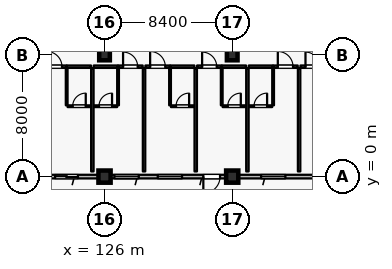
"""IFC4 building model, lengths in metres.
Left out: names, types, materials, properties, quantities, classifications, styles, units other than length and angle.
Written with IfcOpenShell. Run it as: python <this file> out.ifc"""

import sys

from ifc_helpers import new_model, si_unit, direction, frame, frame_2d, origin, origin_2d, place, context, subcontext, project, spatial, rectangle, extrude, element, fill, save


model = new_model("IFC4")
c1 = context("Model", 3, precision=1e-05, world=origin(), true_north=direction((0.0, 1.0)))
c2 = subcontext(c1, "Body", "Model", "MODEL_VIEW")
j1 = project(units=[si_unit("LENGTHUNIT", "METRE"), si_unit("PLANEANGLEUNIT", "RADIAN")], contexts=[c1])
p1 = place(None, origin())
s1 = spatial("IfcSite", under=j1, at=p1, CompositionType="ELEMENT")
p2 = place(p1, origin())
s2 = spatial("IfcBuilding", under=s1, at=p2, CompositionType="ELEMENT")
p3 = place(p2, frame((0.0, 0.0, 25.2)))
s3 = spatial("IfcBuildingStorey", under=s2, at=p3, CompositionType="ELEMENT", Elevation=25.2)
for number, where, z_axis, x_axis in (
    (1, (126.0, 0.0, 0.0), (0.0, 0.0, 1.0), (1.0, 0.0, 0.0)),
    (2, (134.4, 0.0, 0.0), (0.0, 0.0, 1.0), (1.0, 0.0, 0.0)),
):
    element("IfcColumn", number, at=place(p3, frame(where, z_axis=z_axis, x_axis=x_axis)), inside=s3, PredefinedType="COLUMN", context=c2, shape_type="SweptSolid", body=[
        extrude(rectangle(XDim=0.8, YDim=0.8, at=origin_2d()), origin(), (0.0, 0.0, 1.0), 3.6),
    ])
for number, where, z_axis, x_axis in (
    (3, (126.0, 8.0, 0.0), (0.0, 0.0, 1.0), (1.0, 0.0, 0.0)),
    (4, (134.4, 8.0, 0.0), (0.0, 0.0, 1.0), (1.0, 0.0, 0.0)),
):
    element("IfcColumn", number, at=place(p3, frame(where, z_axis=z_axis, x_axis=x_axis)), inside=s3, PredefinedType="COLUMN", context=c2, shape_type="SweptSolid", body=[
        extrude(rectangle(XDim=0.7, YDim=0.7, at=origin_2d()), origin(), (0.0, 0.0, 1.0), 3.6),
    ])
p4 = place(p3, frame((125.6, 0.0, 0.0), z_axis=(0.0, 0.0, 1.0), x_axis=(-1.0, 0.0, 0.0)))
e5 = element("IfcWall", 5, at=p4, inside=s3, PredefinedType="SOLIDWALL", context=c2, shape_type="SweptSolid", body=[
    extrude(rectangle(XDim=7.6, YDim=0.24, at=frame_2d((3.8, 0.0))), origin(), (0.0, 0.0, 1.0), 2.93),
])
p5 = place(p4, frame((1.35, 0.0, 0.0)))
e6 = element("IfcOpeningElement", 6, at=p5, cuts=e5, PredefinedType="OPENING", context=c2, shape_type="SweptSolid", body=[
    extrude(rectangle(XDim=1.5, YDim=2.25, at=frame_2d((0.75, 1.125))), frame((0.0, 0.13, 0.0), z_axis=(0.0, -1.0, 0.0), x_axis=(1.0, 0.0, 0.0)), (0.0, 0.0, 1.0), 0.26),
])
p6 = place(p4, frame((4.7, 0.0, 0.8)))
e7 = element("IfcOpeningElement", 7, at=p6, cuts=e5, PredefinedType="OPENING", context=c2, shape_type="SweptSolid", body=[
    extrude(rectangle(XDim=1.6, YDim=1.6, at=frame_2d((0.8, 0.8))), frame((0.0, 0.13, 0.0), z_axis=(0.0, -1.0, 0.0), x_axis=(1.0, 0.0, 0.0)), (0.0, 0.0, 1.0), 0.26),
])
p7 = place(p3, frame((134.0, 0.0, 0.0), z_axis=(0.0, 0.0, 1.0), x_axis=(-1.0, 0.0, 0.0)))
e8 = element("IfcWall", 8, at=p7, inside=s3, PredefinedType="SOLIDWALL", context=c2, shape_type="SweptSolid", body=[
    extrude(rectangle(XDim=7.6, YDim=0.24, at=frame_2d((3.8, 0.0))), origin(), (0.0, 0.0, 1.0), 2.93),
])
p8 = place(p7, frame((0.4, 0.0, 0.0)))
e9 = element("IfcOpeningElement", 9, at=p8, cuts=e8, PredefinedType="OPENING", context=c2, shape_type="SweptSolid", body=[
    extrude(rectangle(XDim=1.1, YDim=2.2, at=frame_2d((0.55, 1.1))), frame((0.0, 0.13, 0.0), z_axis=(0.0, -1.0, 0.0), x_axis=(1.0, 0.0, 0.0)), (0.0, 0.0, 1.0), 0.26),
])
p9 = place(p7, frame((2.9, 0.0, 0.8)))
e10 = element("IfcOpeningElement", 10, at=p9, cuts=e8, PredefinedType="OPENING", context=c2, shape_type="SweptSolid", body=[
    extrude(rectangle(XDim=1.6, YDim=1.6, at=frame_2d((0.8, 0.8))), frame((0.0, 0.13, 0.0), z_axis=(0.0, -1.0, 0.0), x_axis=(1.0, 0.0, 0.0)), (0.0, 0.0, 1.0), 0.26),
])
p10 = place(p7, frame((5.75, 0.0, 0.8)))
e11 = element("IfcOpeningElement", 11, at=p10, cuts=e8, PredefinedType="OPENING", context=c2, shape_type="SweptSolid", body=[
    extrude(rectangle(XDim=1.6, YDim=1.6, at=frame_2d((0.8, 0.8))), frame((0.0, 0.13, 0.0), z_axis=(0.0, -1.0, 0.0), x_axis=(1.0, 0.0, 0.0)), (0.0, 0.0, 1.0), 0.26),
])
p11 = place(p3, frame((142.4, 0.0, 0.0), z_axis=(0.0, 0.0, 1.0), x_axis=(-1.0, 0.0, 0.0)))
e12 = element("IfcWall", 12, at=p11, inside=s3, PredefinedType="SOLIDWALL", context=c2, shape_type="SweptSolid", body=[
    extrude(rectangle(XDim=7.6, YDim=0.24, at=frame_2d((3.8, 0.0))), origin(), (0.0, 0.0, 1.0), 2.93),
])
p12 = place(p11, frame((1.15, 0.0, 0.0)))
e13 = element("IfcOpeningElement", 13, at=p12, cuts=e12, PredefinedType="OPENING", context=c2, shape_type="SweptSolid", body=[
    extrude(rectangle(XDim=1.5, YDim=2.25, at=frame_2d((0.75, 1.125))), frame((0.0, 0.13, 0.0), z_axis=(0.0, -1.0, 0.0), x_axis=(1.0, 0.0, 0.0)), (0.0, 0.0, 1.0), 0.26),
])
p13 = place(p11, frame((4.5, 0.0, 0.8)))
e14 = element("IfcOpeningElement", 14, at=p13, cuts=e12, PredefinedType="OPENING", context=c2, shape_type="SweptSolid", body=[
    extrude(rectangle(XDim=1.6, YDim=1.6, at=frame_2d((0.8, 0.8))), frame((0.0, 0.13, 0.0), z_axis=(0.0, -1.0, 0.0), x_axis=(1.0, 0.0, 0.0)), (0.0, 0.0, 1.0), 0.26),
])
p14 = place(p3, frame((121.89, 7.23, 0.0), z_axis=(0.0, 0.0, 1.0), x_axis=(1.0, 0.0, 0.0)))
e15 = element("IfcWall", 15, at=p14, inside=s3, PredefinedType="PARTITIONING", context=c2, shape_type="SweptSolid", body=[
    extrude(rectangle(XDim=1.62, YDim=0.16, at=frame_2d((0.81, 0.0))), origin(), (0.0, 0.0, 1.0), 3.335),
])
p15 = place(p14, frame((0.31, 0.0, 0.0)))
e16 = element("IfcOpeningElement", 16, at=p15, cuts=e15, PredefinedType="OPENING", context=c2, shape_type="SweptSolid", body=[
    extrude(rectangle(XDim=1.0, YDim=2.25, at=frame_2d((0.5, 1.125))), frame((0.0, 0.09, 0.0), z_axis=(0.0, -1.0, 0.0), x_axis=(1.0, 0.0, 0.0)), (0.0, 0.0, 1.0), 0.18),
])
p16 = place(p3, frame((123.52, 7.23, 0.0), z_axis=(0.0, 0.0, 1.0), x_axis=(1.0, 0.0, 0.0)))
e17 = element("IfcWall", 17, at=p16, inside=s3, PredefinedType="PARTITIONING", context=c2, shape_type="SweptSolid", body=[
    extrude(rectangle(XDim=1.59, YDim=0.16, at=frame_2d((0.795, 0.0))), origin(), (0.0, 0.0, 1.0), 3.335),
])
p17 = place(p3, frame((123.51, 4.69, 0.0), z_axis=(0.0, 0.0, 1.0), x_axis=(0.0, 1.0, 0.0)))
e18 = element("IfcWall", 18, at=p17, inside=s3, PredefinedType="PARTITIONING", context=c2, shape_type="SweptSolid", body=[
    extrude(rectangle(XDim=2.45, YDim=0.115, at=frame_2d((1.225, 0.0))), origin(), (0.0, 0.0, 1.0), 3.335),
])
p18 = place(p3, frame((123.57, 4.63, 0.0), z_axis=(0.0, 0.0, 1.0), x_axis=(1.0, 0.0, 0.0)))
e19 = element("IfcWall", 19, at=p18, inside=s3, PredefinedType="PARTITIONING", context=c2, shape_type="SweptSolid", body=[
    extrude(rectangle(XDim=1.53, YDim=0.115, at=frame_2d((0.765, 0.0))), origin(), (0.0, 0.0, 1.0), 3.335),
])
p19 = place(p18, frame((0.335, 0.0, 0.0)))
e20 = element("IfcOpeningElement", 20, at=p19, cuts=e19, PredefinedType="OPENING", context=c2, shape_type="SweptSolid", body=[
    extrude(rectangle(XDim=0.86, YDim=2.12, at=frame_2d((0.43, 1.06))), frame((0.0, 0.067, 0.0), z_axis=(0.0, -1.0, 0.0), x_axis=(1.0, 0.0, 0.0)), (0.0, 0.0, 1.0), 0.135),
])
p20 = place(p3, frame((125.29, 7.23, 0.0), z_axis=(0.0, 0.0, 1.0), x_axis=(1.0, 0.0, 0.0)))
e21 = element("IfcWall", 21, at=p20, inside=s3, PredefinedType="PARTITIONING", context=c2, shape_type="SweptSolid", body=[
    extrude(rectangle(XDim=1.59, YDim=0.16, at=frame_2d((0.795, 0.0))), origin(), (0.0, 0.0, 1.0), 3.335),
])
p21 = place(p3, frame((126.89, 7.23, 0.0), z_axis=(0.0, 0.0, 1.0), x_axis=(1.0, 0.0, 0.0)))
e22 = element("IfcWall", 22, at=p21, inside=s3, PredefinedType="PARTITIONING", context=c2, shape_type="SweptSolid", body=[
    extrude(rectangle(XDim=1.62, YDim=0.16, at=frame_2d((0.81, 0.0))), origin(), (0.0, 0.0, 1.0), 3.335),
])
p22 = place(p21, frame((0.33, 0.0, 0.0)))
e23 = element("IfcOpeningElement", 23, at=p22, cuts=e22, PredefinedType="OPENING", context=c2, shape_type="SweptSolid", body=[
    extrude(rectangle(XDim=0.96, YDim=2.2, at=frame_2d((0.48, 1.1))), frame((0.0, 0.09, 0.0), z_axis=(0.0, -1.0, 0.0), x_axis=(1.0, 0.0, 0.0)), (0.0, 0.0, 1.0), 0.18),
])
p23 = place(p3, frame((126.89, 4.69, 0.0), z_axis=(0.0, 0.0, 1.0), x_axis=(0.0, 1.0, 0.0)))
e24 = element("IfcWall", 24, at=p23, inside=s3, PredefinedType="PARTITIONING", context=c2, shape_type="SweptSolid", body=[
    extrude(rectangle(XDim=2.45, YDim=0.115, at=frame_2d((1.225, 0.0))), origin(), (0.0, 0.0, 1.0), 3.335),
])
p24 = place(p3, frame((125.3, 4.63, 0.0), z_axis=(0.0, 0.0, 1.0), x_axis=(1.0, 0.0, 0.0)))
e25 = element("IfcWall", 25, at=p24, inside=s3, PredefinedType="PARTITIONING", context=c2, shape_type="SweptSolid", body=[
    extrude(rectangle(XDim=1.53, YDim=0.115, at=frame_2d((0.765, 0.0))), origin(), (0.0, 0.0, 1.0), 3.335),
])
p25 = place(p24, frame((0.335, 0.0, 0.0)))
e26 = element("IfcOpeningElement", 26, at=p25, cuts=e25, PredefinedType="OPENING", context=c2, shape_type="SweptSolid", body=[
    extrude(rectangle(XDim=0.86, YDim=2.12, at=frame_2d((0.43, 1.06))), frame((0.0, 0.067, 0.0), z_axis=(0.0, -1.0, 0.0), x_axis=(1.0, 0.0, 0.0)), (0.0, 0.0, 1.0), 0.135),
])
p26 = place(p3, frame((125.2, 0.34, 0.0), z_axis=(0.0, 0.0, 1.0), x_axis=(0.0, 1.0, 0.0)))
e27 = element("IfcWall", 27, at=p26, inside=s3, PredefinedType="PARTITIONING", context=c2, shape_type="SweptSolid", body=[
    extrude(rectangle(XDim=6.8, YDim=0.16, at=frame_2d((3.4, 0.0))), origin(), (0.0, 0.0, 1.0), 3.335),
])
p27 = place(p3, frame((128.69, 7.23, 0.0), z_axis=(0.0, 0.0, 1.0), x_axis=(1.0, 0.0, 0.0)))
e28 = element("IfcWall", 28, at=p27, inside=s3, PredefinedType="PARTITIONING", context=c2, shape_type="SweptSolid", body=[
    extrude(rectangle(XDim=1.62, YDim=0.16, at=frame_2d((0.81, 0.0))), origin(), (0.0, 0.0, 1.0), 3.335),
])
p28 = place(p27, frame((0.31, 0.0, 0.0)))
e29 = element("IfcOpeningElement", 29, at=p28, cuts=e28, PredefinedType="OPENING", context=c2, shape_type="SweptSolid", body=[
    extrude(rectangle(XDim=1.0, YDim=2.25, at=frame_2d((0.5, 1.125))), frame((0.0, 0.09, 0.0), z_axis=(0.0, -1.0, 0.0), x_axis=(1.0, 0.0, 0.0)), (0.0, 0.0, 1.0), 0.18),
])
p29 = place(p3, frame((130.32, 7.23, 0.0), z_axis=(0.0, 0.0, 1.0), x_axis=(1.0, 0.0, 0.0)))
e30 = element("IfcWall", 30, at=p29, inside=s3, PredefinedType="PARTITIONING", context=c2, shape_type="SweptSolid", body=[
    extrude(rectangle(XDim=1.59, YDim=0.16, at=frame_2d((0.795, 0.0))), origin(), (0.0, 0.0, 1.0), 3.335),
])
p30 = place(p3, frame((130.31, 4.69, 0.0), z_axis=(0.0, 0.0, 1.0), x_axis=(0.0, 1.0, 0.0)))
e31 = element("IfcWall", 31, at=p30, inside=s3, PredefinedType="PARTITIONING", context=c2, shape_type="SweptSolid", body=[
    extrude(rectangle(XDim=2.45, YDim=0.115, at=frame_2d((1.225, 0.0))), origin(), (0.0, 0.0, 1.0), 3.335),
])
p31 = place(p3, frame((130.37, 4.63, 0.0), z_axis=(0.0, 0.0, 1.0), x_axis=(1.0, 0.0, 0.0)))
e32 = element("IfcWall", 32, at=p31, inside=s3, PredefinedType="PARTITIONING", context=c2, shape_type="SweptSolid", body=[
    extrude(rectangle(XDim=1.53, YDim=0.115, at=frame_2d((0.765, 0.0))), origin(), (0.0, 0.0, 1.0), 3.335),
])
p32 = place(p31, frame((0.335, 0.0, 0.0)))
e33 = element("IfcOpeningElement", 33, at=p32, cuts=e32, PredefinedType="OPENING", context=c2, shape_type="SweptSolid", body=[
    extrude(rectangle(XDim=0.86, YDim=2.12, at=frame_2d((0.43, 1.06))), frame((0.0, 0.067, 0.0), z_axis=(0.0, -1.0, 0.0), x_axis=(1.0, 0.0, 0.0)), (0.0, 0.0, 1.0), 0.135),
])
p33 = place(p3, frame((128.6, 0.34, 0.0), z_axis=(0.0, 0.0, 1.0), x_axis=(0.0, 1.0, 0.0)))
e34 = element("IfcWall", 34, at=p33, inside=s3, PredefinedType="PARTITIONING", context=c2, shape_type="SweptSolid", body=[
    extrude(rectangle(XDim=6.8, YDim=0.16, at=frame_2d((3.4, 0.0))), origin(), (0.0, 0.0, 1.0), 3.335),
])
p34 = place(p3, frame((132.09, 7.23, 0.0), z_axis=(0.0, 0.0, 1.0), x_axis=(1.0, 0.0, 0.0)))
e35 = element("IfcWall", 35, at=p34, inside=s3, PredefinedType="PARTITIONING", context=c2, shape_type="SweptSolid", body=[
    extrude(rectangle(XDim=1.62, YDim=0.16, at=frame_2d((0.81, 0.0))), origin(), (0.0, 0.0, 1.0), 3.335),
])
p35 = place(p34, frame((0.33, 0.0, 0.0)))
e36 = element("IfcOpeningElement", 36, at=p35, cuts=e35, PredefinedType="OPENING", context=c2, shape_type="SweptSolid", body=[
    extrude(rectangle(XDim=0.96, YDim=2.2, at=frame_2d((0.48, 1.1))), frame((0.0, 0.09, 0.0), z_axis=(0.0, -1.0, 0.0), x_axis=(1.0, 0.0, 0.0)), (0.0, 0.0, 1.0), 0.18),
])
p36 = place(p3, frame((133.72, 7.23, 0.0), z_axis=(0.0, 0.0, 1.0), x_axis=(1.0, 0.0, 0.0)))
e37 = element("IfcWall", 37, at=p36, inside=s3, PredefinedType="PARTITIONING", context=c2, shape_type="SweptSolid", body=[
    extrude(rectangle(XDim=1.59, YDim=0.16, at=frame_2d((0.795, 0.0))), origin(), (0.0, 0.0, 1.0), 3.335),
])
p37 = place(p3, frame((133.71, 4.69, 0.0), z_axis=(0.0, 0.0, 1.0), x_axis=(0.0, 1.0, 0.0)))
e38 = element("IfcWall", 38, at=p37, inside=s3, PredefinedType="PARTITIONING", context=c2, shape_type="SweptSolid", body=[
    extrude(rectangle(XDim=2.45, YDim=0.115, at=frame_2d((1.225, 0.0))), origin(), (0.0, 0.0, 1.0), 3.335),
])
p38 = place(p3, frame((133.77, 4.63, 0.0), z_axis=(0.0, 0.0, 1.0), x_axis=(1.0, 0.0, 0.0)))
e39 = element("IfcWall", 39, at=p38, inside=s3, PredefinedType="PARTITIONING", context=c2, shape_type="SweptSolid", body=[
    extrude(rectangle(XDim=1.53, YDim=0.115, at=frame_2d((0.765, 0.0))), origin(), (0.0, 0.0, 1.0), 3.335),
])
p39 = place(p38, frame((0.335, 0.0, 0.0)))
e40 = element("IfcOpeningElement", 40, at=p39, cuts=e39, PredefinedType="OPENING", context=c2, shape_type="SweptSolid", body=[
    extrude(rectangle(XDim=0.86, YDim=2.12, at=frame_2d((0.43, 1.06))), frame((0.0, 0.067, 0.0), z_axis=(0.0, -1.0, 0.0), x_axis=(1.0, 0.0, 0.0)), (0.0, 0.0, 1.0), 0.135),
])
p40 = place(p3, frame((132.0, 0.34, 0.0), z_axis=(0.0, 0.0, 1.0), x_axis=(0.0, 1.0, 0.0)))
e41 = element("IfcWall", 41, at=p40, inside=s3, PredefinedType="PARTITIONING", context=c2, shape_type="SweptSolid", body=[
    extrude(rectangle(XDim=6.8, YDim=0.16, at=frame_2d((3.4, 0.0))), origin(), (0.0, 0.0, 1.0), 3.335),
])
p41 = place(p3, frame((135.49, 7.23, 0.0), z_axis=(0.0, 0.0, 1.0), x_axis=(1.0, 0.0, 0.0)))
e42 = element("IfcWall", 42, at=p41, inside=s3, PredefinedType="PARTITIONING", context=c2, shape_type="SweptSolid", body=[
    extrude(rectangle(XDim=1.59, YDim=0.16, at=frame_2d((0.795, 0.0))), origin(), (0.0, 0.0, 1.0), 3.335),
])
p42 = place(p3, frame((137.09, 7.23, 0.0), z_axis=(0.0, 0.0, 1.0), x_axis=(1.0, 0.0, 0.0)))
e43 = element("IfcWall", 43, at=p42, inside=s3, PredefinedType="PARTITIONING", context=c2, shape_type="SweptSolid", body=[
    extrude(rectangle(XDim=1.62, YDim=0.16, at=frame_2d((0.81, 0.0))), origin(), (0.0, 0.0, 1.0), 3.335),
])
p43 = place(p42, frame((0.31, 0.0, 0.0)))
e44 = element("IfcOpeningElement", 44, at=p43, cuts=e43, PredefinedType="OPENING", context=c2, shape_type="SweptSolid", body=[
    extrude(rectangle(XDim=1.0, YDim=2.25, at=frame_2d((0.5, 1.125))), frame((0.0, 0.09, 0.0), z_axis=(0.0, -1.0, 0.0), x_axis=(1.0, 0.0, 0.0)), (0.0, 0.0, 1.0), 0.18),
])
p44 = place(p3, frame((137.09, 4.69, 0.0), z_axis=(0.0, 0.0, 1.0), x_axis=(0.0, 1.0, 0.0)))
e45 = element("IfcWall", 45, at=p44, inside=s3, PredefinedType="PARTITIONING", context=c2, shape_type="SweptSolid", body=[
    extrude(rectangle(XDim=2.45, YDim=0.115, at=frame_2d((1.225, 0.0))), origin(), (0.0, 0.0, 1.0), 3.335),
])
p45 = place(p3, frame((135.5, 4.63, 0.0), z_axis=(0.0, 0.0, 1.0), x_axis=(1.0, 0.0, 0.0)))
e46 = element("IfcWall", 46, at=p45, inside=s3, PredefinedType="PARTITIONING", context=c2, shape_type="SweptSolid", body=[
    extrude(rectangle(XDim=1.53, YDim=0.115, at=frame_2d((0.765, 0.0))), origin(), (0.0, 0.0, 1.0), 3.335),
])
p46 = place(p45, frame((0.335, 0.0, 0.0)))
e47 = element("IfcOpeningElement", 47, at=p46, cuts=e46, PredefinedType="OPENING", context=c2, shape_type="SweptSolid", body=[
    extrude(rectangle(XDim=0.86, YDim=2.12, at=frame_2d((0.43, 1.06))), frame((0.0, 0.067, 0.0), z_axis=(0.0, -1.0, 0.0), x_axis=(1.0, 0.0, 0.0)), (0.0, 0.0, 1.0), 0.135),
])
p47 = place(p3, frame((135.4, 0.34, 0.0), z_axis=(0.0, 0.0, 1.0), x_axis=(0.0, 1.0, 0.0)))
e48 = element("IfcWall", 48, at=p47, inside=s3, PredefinedType="PARTITIONING", context=c2, shape_type="SweptSolid", body=[
    extrude(rectangle(XDim=6.8, YDim=0.16, at=frame_2d((3.4, 0.0))), origin(), (0.0, 0.0, 1.0), 3.335),
])
p48 = place(p3, frame((138.89, 7.23, 0.0), z_axis=(0.0, 0.0, 1.0), x_axis=(1.0, 0.0, 0.0)))
e49 = element("IfcWall", 49, at=p48, inside=s3, PredefinedType="PARTITIONING", context=c2, shape_type="SweptSolid", body=[
    extrude(rectangle(XDim=1.62, YDim=0.16, at=frame_2d((0.81, 0.0))), origin(), (0.0, 0.0, 1.0), 3.335),
])
p49 = place(p48, frame((0.33, 0.0, 0.0)))
e50 = element("IfcOpeningElement", 50, at=p49, cuts=e49, PredefinedType="OPENING", context=c2, shape_type="SweptSolid", body=[
    extrude(rectangle(XDim=0.96, YDim=2.2, at=frame_2d((0.48, 1.1))), frame((0.0, 0.09, 0.0), z_axis=(0.0, -1.0, 0.0), x_axis=(1.0, 0.0, 0.0)), (0.0, 0.0, 1.0), 0.18),
])
p50 = place(p3, frame((138.8, 0.34, 0.0), z_axis=(0.0, 0.0, 1.0), x_axis=(0.0, 1.0, 0.0)))
e51 = element("IfcWall", 51, at=p50, inside=s3, PredefinedType="PARTITIONING", context=c2, shape_type="SweptSolid", body=[
    extrude(rectangle(XDim=6.8, YDim=0.16, at=frame_2d((3.4, 0.0))), origin(), (0.0, 0.0, 1.0), 3.335),
])
p51 = place(p5, origin())
e52 = element("IfcDoor", 52, at=p51, inside=s3, OperationType="SLIDING_TO_LEFT", PredefinedType="DOOR", context=c2, shape_type="SweptSolid", body=[
    extrude(rectangle(XDim=1.5, YDim=2.25, at=frame_2d((0.75, 1.125))), frame((0.0, 0.025, 0.0), z_axis=(0.0, -1.0, 0.0), x_axis=(1.0, 0.0, 0.0)), (0.0, 0.0, 1.0), 0.05),
])
fill(e6, e52)
p52 = place(p8, origin())
e53 = element("IfcDoor", 53, at=p52, inside=s3, OperationType="SINGLE_SWING_RIGHT", PredefinedType="DOOR", context=c2, shape_type="SweptSolid", body=[
    extrude(rectangle(XDim=1.1, YDim=2.2, at=frame_2d((0.55, 1.1))), frame((0.0, 0.025, 0.0), z_axis=(0.0, -1.0, 0.0), x_axis=(1.0, 0.0, 0.0)), (0.0, 0.0, 1.0), 0.05),
])
fill(e9, e53)
p53 = place(p9, origin())
e54 = element("IfcWindow", 54, at=p53, inside=s3, PartitioningType="SINGLE_PANEL", PredefinedType="WINDOW", context=c2, shape_type="SweptSolid", body=[
    extrude(rectangle(XDim=1.6, YDim=1.6, at=frame_2d((0.8, 0.8))), frame((0.0, 0.03, 0.0), z_axis=(0.0, -1.0, 0.0), x_axis=(1.0, 0.0, 0.0)), (0.0, 0.0, 1.0), 0.06),
])
fill(e10, e54)
p54 = place(p10, origin())
e55 = element("IfcWindow", 55, at=p54, inside=s3, PartitioningType="SINGLE_PANEL", PredefinedType="WINDOW", context=c2, shape_type="SweptSolid", body=[
    extrude(rectangle(XDim=1.6, YDim=1.6, at=frame_2d((0.8, 0.8))), frame((0.0, 0.03, 0.0), z_axis=(0.0, -1.0, 0.0), x_axis=(1.0, 0.0, 0.0)), (0.0, 0.0, 1.0), 0.06),
])
fill(e11, e55)
p55 = place(p13, origin())
e56 = element("IfcWindow", 56, at=p55, inside=s3, PartitioningType="SINGLE_PANEL", PredefinedType="WINDOW", context=c2, shape_type="SweptSolid", body=[
    extrude(rectangle(XDim=1.6, YDim=1.6, at=frame_2d((0.8, 0.8))), frame((0.0, 0.03, 0.0), z_axis=(0.0, -1.0, 0.0), x_axis=(1.0, 0.0, 0.0)), (0.0, 0.0, 1.0), 0.06),
])
fill(e14, e56)
p56 = place(p15, origin())
e57 = element("IfcDoor", 57, at=p56, inside=s3, OperationType="SINGLE_SWING_LEFT", PredefinedType="DOOR", context=c2, shape_type="SweptSolid", body=[
    extrude(rectangle(XDim=1.0, YDim=2.25, at=frame_2d((0.5, 1.125))), frame((0.0, 0.025, 0.0), z_axis=(0.0, -1.0, 0.0), x_axis=(1.0, 0.0, 0.0)), (0.0, 0.0, 1.0), 0.05),
])
fill(e16, e57)
p57 = place(p19, origin())
e58 = element("IfcDoor", 58, at=p57, inside=s3, OperationType="SINGLE_SWING_RIGHT", PredefinedType="DOOR", context=c2, shape_type="SweptSolid", body=[
    extrude(rectangle(XDim=0.86, YDim=2.12, at=frame_2d((0.43, 1.06))), frame((0.0, 0.025, 0.0), z_axis=(0.0, -1.0, 0.0), x_axis=(1.0, 0.0, 0.0)), (0.0, 0.0, 1.0), 0.05),
])
fill(e20, e58)
p58 = place(p22, origin())
e59 = element("IfcDoor", 59, at=p58, inside=s3, OperationType="SINGLE_SWING_LEFT", PredefinedType="DOOR", context=c2, shape_type="SweptSolid", body=[
    extrude(rectangle(XDim=0.96, YDim=2.2, at=frame_2d((0.48, 1.1))), frame((0.0, 0.025, 0.0), z_axis=(0.0, -1.0, 0.0), x_axis=(1.0, 0.0, 0.0)), (0.0, 0.0, 1.0), 0.05),
])
fill(e23, e59)
p59 = place(p25, origin())
e60 = element("IfcDoor", 60, at=p59, inside=s3, OperationType="SINGLE_SWING_RIGHT", PredefinedType="DOOR", context=c2, shape_type="SweptSolid", body=[
    extrude(rectangle(XDim=0.86, YDim=2.12, at=frame_2d((0.43, 1.06))), frame((0.0, 0.025, 0.0), z_axis=(0.0, -1.0, 0.0), x_axis=(1.0, 0.0, 0.0)), (0.0, 0.0, 1.0), 0.05),
])
fill(e26, e60)
p60 = place(p28, origin())
e61 = element("IfcDoor", 61, at=p60, inside=s3, OperationType="SINGLE_SWING_LEFT", PredefinedType="DOOR", context=c2, shape_type="SweptSolid", body=[
    extrude(rectangle(XDim=1.0, YDim=2.25, at=frame_2d((0.5, 1.125))), frame((0.0, 0.025, 0.0), z_axis=(0.0, -1.0, 0.0), x_axis=(1.0, 0.0, 0.0)), (0.0, 0.0, 1.0), 0.05),
])
fill(e29, e61)
p61 = place(p32, origin())
e62 = element("IfcDoor", 62, at=p61, inside=s3, OperationType="SINGLE_SWING_RIGHT", PredefinedType="DOOR", context=c2, shape_type="SweptSolid", body=[
    extrude(rectangle(XDim=0.86, YDim=2.12, at=frame_2d((0.43, 1.06))), frame((0.0, 0.025, 0.0), z_axis=(0.0, -1.0, 0.0), x_axis=(1.0, 0.0, 0.0)), (0.0, 0.0, 1.0), 0.05),
])
fill(e33, e62)
p62 = place(p35, origin())
e63 = element("IfcDoor", 63, at=p62, inside=s3, OperationType="SINGLE_SWING_LEFT", PredefinedType="DOOR", context=c2, shape_type="SweptSolid", body=[
    extrude(rectangle(XDim=0.96, YDim=2.2, at=frame_2d((0.48, 1.1))), frame((0.0, 0.025, 0.0), z_axis=(0.0, -1.0, 0.0), x_axis=(1.0, 0.0, 0.0)), (0.0, 0.0, 1.0), 0.05),
])
fill(e36, e63)
p63 = place(p39, origin())
e64 = element("IfcDoor", 64, at=p63, inside=s3, OperationType="SINGLE_SWING_RIGHT", PredefinedType="DOOR", context=c2, shape_type="SweptSolid", body=[
    extrude(rectangle(XDim=0.86, YDim=2.12, at=frame_2d((0.43, 1.06))), frame((0.0, 0.025, 0.0), z_axis=(0.0, -1.0, 0.0), x_axis=(1.0, 0.0, 0.0)), (0.0, 0.0, 1.0), 0.05),
])
fill(e40, e64)
p64 = place(p43, origin())
e65 = element("IfcDoor", 65, at=p64, inside=s3, OperationType="SINGLE_SWING_LEFT", PredefinedType="DOOR", context=c2, shape_type="SweptSolid", body=[
    extrude(rectangle(XDim=1.0, YDim=2.25, at=frame_2d((0.5, 1.125))), frame((0.0, 0.025, 0.0), z_axis=(0.0, -1.0, 0.0), x_axis=(1.0, 0.0, 0.0)), (0.0, 0.0, 1.0), 0.05),
])
fill(e44, e65)
p65 = place(p46, origin())
e66 = element("IfcDoor", 66, at=p65, inside=s3, OperationType="SINGLE_SWING_RIGHT", PredefinedType="DOOR", context=c2, shape_type="SweptSolid", body=[
    extrude(rectangle(XDim=0.86, YDim=2.12, at=frame_2d((0.43, 1.06))), frame((0.0, 0.025, 0.0), z_axis=(0.0, -1.0, 0.0), x_axis=(1.0, 0.0, 0.0)), (0.0, 0.0, 1.0), 0.05),
])
fill(e47, e66)
p66 = place(p49, origin())
e67 = element("IfcDoor", 67, at=p66, inside=s3, OperationType="SINGLE_SWING_LEFT", PredefinedType="DOOR", context=c2, shape_type="SweptSolid", body=[
    extrude(rectangle(XDim=0.96, YDim=2.2, at=frame_2d((0.48, 1.1))), frame((0.0, 0.025, 0.0), z_axis=(0.0, -1.0, 0.0), x_axis=(1.0, 0.0, 0.0)), (0.0, 0.0, 1.0), 0.05),
])
fill(e50, e67)
save(model, sys.argv[1])
